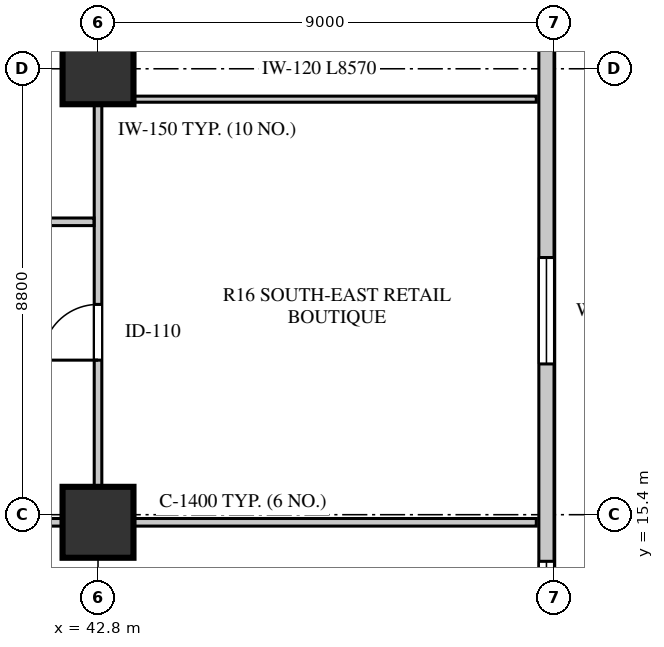
"""IFC4 building model, lengths in metres.
Left out: names, types, materials, properties, quantities, classifications, styles, units other than length and angle.
Written with IfcOpenShell. Run it as: python <this file> out.ifc"""

import sys

from ifc_helpers import new_model, si_unit, direction, frame, frame_2d, origin, origin_2d, place, context, subcontext, project, spatial, rectangle, extrude, element, fill, save


model = new_model("IFC4")
c1 = context("Model", 3, precision=1e-05, world=origin(), true_north=direction((0.0, 1.0)))
c2 = subcontext(c1, "Body", "Model", "MODEL_VIEW")
j1 = project(units=[si_unit("LENGTHUNIT", "METRE"), si_unit("PLANEANGLEUNIT", "RADIAN")], contexts=[c1])
p1 = place(None, origin())
s1 = spatial("IfcSite", under=j1, at=p1, CompositionType="ELEMENT")
p2 = place(p1, origin())
s2 = spatial("IfcBuilding", under=s1, at=p2, CompositionType="ELEMENT")
p3 = place(p2, frame((0.0, 0.0, 8.0)))
s3 = spatial("IfcBuildingStorey", under=s2, at=p3, CompositionType="ELEMENT", Elevation=8.0)
for number, where, z_axis, x_axis in (
    (1, (42.8, 15.25, 0.0), (0.0, 0.0, 1.0), (1.0, 0.0, 0.0)),
    (2, (42.8, 24.2, 0.0), (0.0, 0.0, 1.0), (1.0, 0.0, 0.0)),
):
    element("IfcColumn", number, at=place(p3, frame(where, z_axis=z_axis, x_axis=x_axis)), inside=s3, PredefinedType="COLUMN", context=c2, shape_type="SweptSolid", body=[
        extrude(rectangle(XDim=1.4, YDim=1.4, at=origin_2d()), origin(), (0.0, 0.0, 1.0), 4.22),
    ])
p4 = place(p3, frame((51.65, 12.4, 0.0), z_axis=(0.0, 0.0, 1.0), x_axis=(0.0, 1.0, 0.0)))
e3 = element("IfcWall", 3, at=p4, inside=s3, PredefinedType="STANDARD", context=c2, shape_type="SweptSolid", body=[
    extrude(rectangle(XDim=32.4, YDim=0.3, at=frame_2d((16.2, 0.0))), origin(), (0.0, 0.0, 1.0), 4.22),
])
p5 = place(p4, frame((0.88, 0.0, 0.8)))
e4 = element("IfcOpeningElement", 4, at=p5, cuts=e3, PredefinedType="OPENING", context=c2, shape_type="SweptSolid", body=[
    extrude(rectangle(XDim=1.2, YDim=1.75, at=frame_2d((0.6, 0.875))), frame((0.0, 0.16, 0.0), z_axis=(0.0, -1.0, 0.0), x_axis=(1.0, 0.0, 0.0)), (0.0, 0.0, 1.0), 0.32),
])
p6 = place(p4, frame((5.975, 0.0, 0.8)))
e5 = element("IfcOpeningElement", 5, at=p6, cuts=e3, PredefinedType="OPENING", context=c2, shape_type="SweptSolid", body=[
    extrude(rectangle(XDim=2.1, YDim=1.95, at=frame_2d((1.05, 0.975))), frame((0.0, 0.16, 0.0), z_axis=(0.0, -1.0, 0.0), x_axis=(1.0, 0.0, 0.0)), (0.0, 0.0, 1.0), 0.32),
])
p7 = place(p4, frame((15.125, 0.0, 0.8)))
e6 = element("IfcOpeningElement", 6, at=p7, cuts=e3, PredefinedType="OPENING", context=c2, shape_type="SweptSolid", body=[
    extrude(rectangle(XDim=1.35, YDim=1.9, at=frame_2d((0.675, 0.95))), frame((0.0, 0.16, 0.0), z_axis=(0.0, -1.0, 0.0), x_axis=(1.0, 0.0, 0.0)), (0.0, 0.0, 1.0), 0.32),
])
p8 = place(p4, frame((21.975, 0.0, 0.8)))
e7 = element("IfcOpeningElement", 7, at=p8, cuts=e3, PredefinedType="OPENING", context=c2, shape_type="SweptSolid", body=[
    extrude(rectangle(XDim=1.65, YDim=1.95, at=frame_2d((0.825, 0.975))), frame((0.0, 0.16, 0.0), z_axis=(0.0, -1.0, 0.0), x_axis=(1.0, 0.0, 0.0)), (0.0, 0.0, 1.0), 0.32),
])
p9 = place(p4, frame((26.4, 0.0, 0.8)))
e8 = element("IfcOpeningElement", 8, at=p9, cuts=e3, PredefinedType="OPENING", context=c2, shape_type="SweptSolid", body=[
    extrude(rectangle(XDim=1.95, YDim=2.0, at=frame_2d((0.975, 1.0))), frame((0.0, 0.16, 0.0), z_axis=(0.0, -1.0, 0.0), x_axis=(1.0, 0.0, 0.0)), (0.0, 0.0, 1.0), 0.32),
])
p10 = place(p4, frame((30.32, 0.0, 0.8)))
e9 = element("IfcOpeningElement", 9, at=p10, cuts=e3, PredefinedType="OPENING", context=c2, shape_type="SweptSolid", body=[
    extrude(rectangle(XDim=1.2, YDim=1.75, at=frame_2d((0.6, 0.875))), frame((0.0, 0.16, 0.0), z_axis=(0.0, -1.0, 0.0), x_axis=(1.0, 0.0, 0.0)), (0.0, 0.0, 1.0), 0.32),
])
p11 = place(p3, frame((42.8, 15.25, 0.0), z_axis=(0.0, 0.0, 1.0), x_axis=(0.0, 1.0, 0.0)))
e10 = element("IfcWall", 10, at=p11, inside=s3, PredefinedType="PARTITIONING", context=c2, shape_type="SweptSolid", body=[
    extrude(rectangle(XDim=26.7, YDim=0.15, at=frame_2d((13.35, 0.0))), origin(), (0.0, 0.0, 1.0), 3.42),
])
p12 = place(p11, frame((3.2, 0.0, 0.0)))
e11 = element("IfcOpeningElement", 11, at=p12, cuts=e10, PredefinedType="OPENING", context=c2, shape_type="SweptSolid", body=[
    extrude(rectangle(XDim=1.1, YDim=2.08, at=frame_2d((0.55, 1.04))), frame((0.0, 0.085, 0.0), z_axis=(0.0, -1.0, 0.0), x_axis=(1.0, 0.0, 0.0)), (0.0, 0.0, 1.0), 0.17),
])
p13 = place(p11, frame((12.1, 0.0, 0.0)))
e12 = element("IfcOpeningElement", 12, at=p13, cuts=e10, PredefinedType="OPENING", context=c2, shape_type="SweptSolid", body=[
    extrude(rectangle(XDim=1.2, YDim=2.1, at=frame_2d((0.6, 1.05))), frame((0.0, 0.085, 0.0), z_axis=(0.0, -1.0, 0.0), x_axis=(1.0, 0.0, 0.0)), (0.0, 0.0, 1.0), 0.17),
])
p14 = place(p11, frame((20.0, 0.0, 0.0)))
e13 = element("IfcOpeningElement", 13, at=p14, cuts=e10, PredefinedType="OPENING", context=c2, shape_type="SweptSolid", body=[
    extrude(rectangle(XDim=0.9, YDim=2.05, at=frame_2d((0.45, 1.025))), frame((0.0, 0.085, 0.0), z_axis=(0.0, -1.0, 0.0), x_axis=(1.0, 0.0, 0.0)), (0.0, 0.0, 1.0), 0.17),
])
p15 = place(p11, frame((23.8, 0.0, 0.0)))
e14 = element("IfcOpeningElement", 14, at=p15, cuts=e10, PredefinedType="OPENING", context=c2, shape_type="SweptSolid", body=[
    extrude(rectangle(XDim=0.95, YDim=2.05, at=frame_2d((0.475, 1.025))), frame((0.0, 0.085, 0.0), z_axis=(0.0, -1.0, 0.0), x_axis=(1.0, 0.0, 0.0)), (0.0, 0.0, 1.0), 0.17),
])
p16 = place(p3, frame((38.75, 15.25, 0.0), z_axis=(0.0, 0.0, 1.0), x_axis=(1.0, 0.0, 0.0)))
e15 = element("IfcWall", 15, at=p16, inside=s3, PredefinedType="PARTITIONING", context=c2, shape_type="SweptSolid", body=[
    extrude(rectangle(XDim=12.7, YDim=0.15, at=frame_2d((6.35, 0.0))), origin(), (0.0, 0.0, 1.0), 3.42),
])
p17 = place(p3, frame((38.92, 21.18, 0.0), z_axis=(0.0, 0.0, 1.0), x_axis=(1.0, 0.0, 0.0)))
e16 = element("IfcWall", 16, at=p17, inside=s3, PredefinedType="PARTITIONING", context=c2, shape_type="SweptSolid", body=[
    extrude(rectangle(XDim=3.8, YDim=0.15, at=frame_2d((1.9, 0.0))), origin(), (0.0, 0.0, 1.0), 4.22),
])
p18 = place(p17, frame((1.1, 0.0, 0.0)))
e17 = element("IfcOpeningElement", 17, at=p18, cuts=e16, PredefinedType="OPENING", context=c2, shape_type="SweptSolid", body=[
    extrude(rectangle(XDim=1.05, YDim=2.1, at=frame_2d((0.525, 1.05))), frame((0.0, 0.085, 0.0), z_axis=(0.0, -1.0, 0.0), x_axis=(1.0, 0.0, 0.0)), (0.0, 0.0, 1.0), 0.17),
])
p19 = place(p3, frame((42.88, 23.6, 0.0), z_axis=(0.0, 0.0, 1.0), x_axis=(1.0, 0.0, 0.0)))
e18 = element("IfcWall", 18, at=p19, inside=s3, PredefinedType="PARTITIONING", context=c2, shape_type="SweptSolid", body=[
    extrude(rectangle(XDim=8.57, YDim=0.12, at=frame_2d((4.285, 0.0))), origin(), (0.0, 0.0, 1.0), 4.22),
])
p20 = place(p5, origin())
e19 = element("IfcWindow", 19, at=p20, inside=s3, PartitioningType="SINGLE_PANEL", PredefinedType="WINDOW", context=c2, shape_type="SweptSolid", body=[
    extrude(rectangle(XDim=1.2, YDim=1.75, at=frame_2d((0.6, 0.875))), frame((0.0, 0.03, 0.0), z_axis=(0.0, -1.0, 0.0), x_axis=(1.0, 0.0, 0.0)), (0.0, 0.0, 1.0), 0.06),
])
fill(e4, e19)
p21 = place(p6, origin())
e20 = element("IfcWindow", 20, at=p21, inside=s3, PartitioningType="SINGLE_PANEL", PredefinedType="WINDOW", context=c2, shape_type="SweptSolid", body=[
    extrude(rectangle(XDim=2.1, YDim=1.95, at=frame_2d((1.05, 0.975))), frame((0.0, 0.03, 0.0), z_axis=(0.0, -1.0, 0.0), x_axis=(1.0, 0.0, 0.0)), (0.0, 0.0, 1.0), 0.06),
])
fill(e5, e20)
p22 = place(p12, origin())
e21 = element("IfcDoor", 21, at=p22, inside=s3, OperationType="SINGLE_SWING_LEFT", PredefinedType="DOOR", context=c2, shape_type="SweptSolid", body=[
    extrude(rectangle(XDim=1.1, YDim=2.08, at=frame_2d((0.55, 1.04))), frame((0.0, 0.025, 0.0), z_axis=(0.0, -1.0, 0.0), x_axis=(1.0, 0.0, 0.0)), (0.0, 0.0, 1.0), 0.05),
])
fill(e11, e21)
save(model, sys.argv[1])
